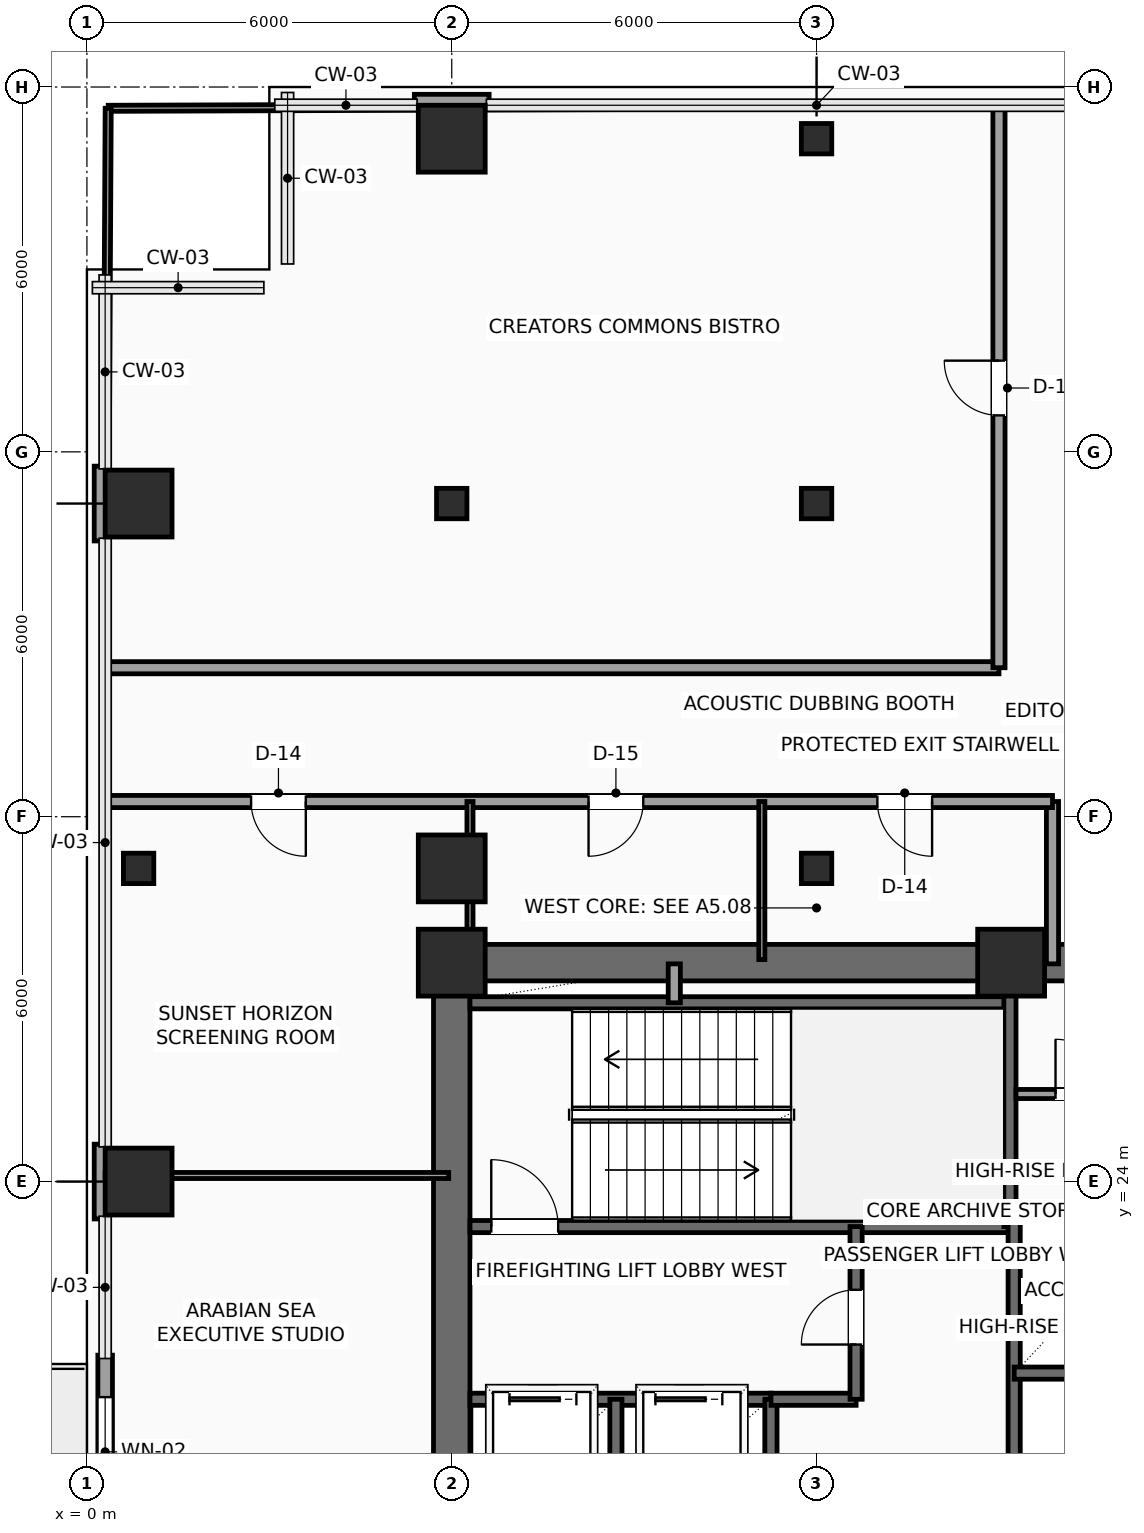
"""IFC4 building model, lengths in metres.
Left out: names, types, materials, properties, quantities, classifications, styles, units other than length and angle.
Written with IfcOpenShell. Run it as: python <this file> out.ifc"""

import sys

from ifc_helpers import new_model, si_unit, direction, frame, frame_2d, origin, origin_2d, place, context, subcontext, project, spatial, rectangle, hollow_rectangle, extrude, element, fill, save


model = new_model("IFC4")
c1 = context("Model", 3, precision=1e-05, world=origin(), true_north=direction((0.0, 1.0)))
c2 = subcontext(c1, "Body", "Model", "MODEL_VIEW")
j1 = project(units=[si_unit("LENGTHUNIT", "METRE"), si_unit("PLANEANGLEUNIT", "RADIAN")], contexts=[c1])
p1 = place(None, origin())
s1 = spatial("IfcSite", under=j1, at=p1, CompositionType="ELEMENT")
p2 = place(p1, origin())
s2 = spatial("IfcBuilding", under=s1, at=p2, CompositionType="ELEMENT")
p3 = place(p2, frame((0.0, 0.0, 145.65)))
s3 = spatial("IfcBuildingStorey", under=s2, at=p3, CompositionType="ELEMENT", Elevation=145.65)
for number, where, z_axis, x_axis in (
    (1, (6.0, 27.6, 0.0), (0.0, 0.0, 1.0), (1.0, 0.0, 0.0)),
    (2, (15.2, 27.6, 0.0), (0.0, 0.0, 1.0), (1.0, 0.0, 0.0)),
    (3, (0.85, 24.0, 0.0), (0.0, 0.0, 1.0), (1.0, 0.0, 0.0)),
):
    element("IfcColumn", number, at=place(p3, frame(where, z_axis=z_axis, x_axis=x_axis)), inside=s3, PredefinedType="COLUMN", context=c2, shape_type="SweptSolid", body=[
        extrude(rectangle(XDim=1.1, YDim=1.1, at=origin_2d()), origin(), (0.0, 0.0, 1.0), 3.75),
    ])
p4 = place(p3, frame((0.85, 29.15, 0.0), z_axis=(0.0, 0.0, 1.0), x_axis=(1.0, 0.0, 0.0)))
e4 = element("IfcColumn", 4, at=p4, inside=s3, PredefinedType="COLUMN", context=c2, shape_type="SweptSolid", body=[
    extrude(hollow_rectangle(XDim=0.5, YDim=0.5, WallThickness=0.025, InnerFilletRadius=0.025, OuterFilletRadius=0.04, at=origin_2d()), origin(), (0.0, 0.0, 1.0), 3.75),
])
for number, where, z_axis, x_axis in (
    (5, (0.85, 35.15, 0.0), (0.0, 0.0, 1.0), (1.0, 0.0, 0.0)),
    (6, (6.0, 29.15, 0.0), (0.0, 0.0, 1.0), (1.0, 0.0, 0.0)),
):
    element("IfcColumn", number, at=place(p3, frame(where, z_axis=z_axis, x_axis=x_axis)), inside=s3, PredefinedType="COLUMN", context=c2, shape_type="SweptSolid", body=[
        extrude(rectangle(XDim=1.1, YDim=1.1, at=origin_2d()), origin(), (0.0, 0.0, 1.0), 3.75),
    ])
p5 = place(p3, frame((6.0, 35.15, 0.0), z_axis=(0.0, 0.0, 1.0), x_axis=(1.0, 0.0, 0.0)))
e7 = element("IfcColumn", 7, at=p5, inside=s3, PredefinedType="COLUMN", context=c2, shape_type="SweptSolid", body=[
    extrude(hollow_rectangle(XDim=0.5, YDim=0.5, WallThickness=0.025, InnerFilletRadius=0.025, OuterFilletRadius=0.04, at=origin_2d()), origin(), (0.0, 0.0, 1.0), 3.75),
])
p6 = place(p3, frame((6.0, 41.15, 0.0), z_axis=(0.0, 0.0, 1.0), x_axis=(1.0, 0.0, 0.0)))
e8 = element("IfcColumn", 8, at=p6, inside=s3, PredefinedType="COLUMN", context=c2, shape_type="SweptSolid", body=[
    extrude(rectangle(XDim=1.1, YDim=1.1, at=origin_2d()), origin(), (0.0, 0.0, 1.0), 3.75),
])
for number, where, z_axis, x_axis in (
    (9, (12.0, 29.15, 0.0), (0.0, 0.0, 1.0), (1.0, 0.0, 0.0)),
    (10, (12.0, 35.15, 0.0), (0.0, 0.0, 1.0), (1.0, 0.0, 0.0)),
    (11, (12.0, 41.15, 0.0), (0.0, 0.0, 1.0), (1.0, 0.0, 0.0)),
):
    element("IfcColumn", number, at=place(p3, frame(where, z_axis=z_axis, x_axis=x_axis)), inside=s3, PredefinedType="COLUMN", context=c2, shape_type="SweptSolid", body=[
        extrude(hollow_rectangle(XDim=0.5, YDim=0.5, WallThickness=0.025, InnerFilletRadius=0.025, OuterFilletRadius=0.04, at=origin_2d()), origin(), (0.0, 0.0, 1.0), 3.75),
    ])
p7 = place(p3, frame((0.3, 11.855, 0.0), z_axis=(0.0, 0.0, 1.0), x_axis=(0.0, 1.0, 0.0)))
e12 = element("IfcWall", 12, at=p7, inside=s3, PredefinedType="SOLIDWALL", context=c2, shape_type="SweptSolid", body=[
    extrude(rectangle(XDim=9.29, YDim=0.24, at=frame_2d((4.645, 0.0))), origin(), (0.0, 0.0, 1.0), 3.525),
])
p8 = place(p7, frame((4.2, 0.0, 0.0)))
e13 = element("IfcOpeningElement", 13, at=p8, cuts=e12, PredefinedType="OPENING", context=c2, shape_type="SweptSolid", body=[
    extrude(rectangle(XDim=1.05, YDim=2.2, at=frame_2d((0.525, 1.1))), frame((0.0, 0.13, 0.0), z_axis=(0.0, -1.0, 0.0), x_axis=(1.0, 0.0, 0.0)), (0.0, 0.0, 1.0), 0.26),
])
p9 = place(p7, frame((6.8, 0.0, 0.85)))
e14 = element("IfcOpeningElement", 14, at=p9, cuts=e12, PredefinedType="OPENING", context=c2, shape_type="SweptSolid", body=[
    extrude(rectangle(XDim=1.8, YDim=2.1, at=frame_2d((0.9, 1.05))), frame((0.0, 0.13, 0.0), z_axis=(0.0, -1.0, 0.0), x_axis=(1.0, 0.0, 0.0)), (0.0, 0.0, 1.0), 0.26),
])
for number, where, z_axis, x_axis in (
    (15, (0.24, 23.385, 0.0), (0.0, 0.0, 1.0), (0.0, 1.0, 0.0)),
    (16, (0.24, 34.535, 0.0), (0.0, 0.0, 1.0), (0.0, 1.0, 0.0)),
    (17, (5.385, 41.76, 0.0), (0.0, 0.0, 1.0), (1.0, 0.0, 0.0)),
):
    element("IfcWall", number, at=place(p3, frame(where, z_axis=z_axis, x_axis=x_axis)), inside=s3, PredefinedType="SOLIDWALL", context=c2, shape_type="SweptSolid", body=[
        extrude(rectangle(XDim=1.23, YDim=0.24, at=frame_2d((0.615, 0.0))), origin(), (0.0, 0.0, 1.0), 3.525),
    ])
p10 = place(p3, frame((6.0, 27.6, 0.0), z_axis=(0.0, 0.0, 1.0), x_axis=(1.0, 0.0, 0.0)))
e18 = element("IfcWall", 18, at=p10, inside=s3, PredefinedType="SHEAR", context=c2, shape_type="SweptSolid", body=[
    extrude(rectangle(XDim=12.0, YDim=0.6, at=frame_2d((6.0, 0.0))), origin(), (0.0, 0.0, 1.0), 3.525),
])
p11 = place(p10, frame((10.2, 0.0, 0.0)))
e19 = element("IfcOpeningElement", 19, at=p11, cuts=e18, PredefinedType="OPENING", context=c2, shape_type="SweptSolid", body=[
    extrude(rectangle(XDim=0.9, YDim=2.15, at=frame_2d((0.45, 1.075))), frame((0.0, 0.31, 0.0), z_axis=(0.0, -1.0, 0.0), x_axis=(1.0, 0.0, 0.0)), (0.0, 0.0, 1.0), 0.62),
])
p12 = place(p3, frame((6.0, 18.0, 0.0), z_axis=(0.0, 0.0, 1.0), x_axis=(0.0, 1.0, 0.0)))
e20 = element("IfcWall", 20, at=p12, inside=s3, PredefinedType="SHEAR", context=c2, shape_type="SweptSolid", body=[
    extrude(rectangle(XDim=9.6, YDim=0.6, at=frame_2d((4.8, 0.0))), origin(), (0.0, 0.0, 1.0), 3.525),
])
p13 = place(p3, frame((6.3, 23.26, 0.0), z_axis=(0.0, 0.0, 1.0), x_axis=(1.0, 0.0, 0.0)))
e21 = element("IfcWall", 21, at=p13, inside=s3, PredefinedType="SHEAR", context=c2, shape_type="SweptSolid", body=[
    extrude(rectangle(XDim=8.88, YDim=0.2, at=frame_2d((4.44, 0.0))), origin(), (0.0, 0.0, 1.0), 3.525),
])
p14 = place(p13, frame((0.35, 0.0, 0.0)))
e22 = element("IfcOpeningElement", 22, at=p14, cuts=e21, PredefinedType="OPENING", context=c2, shape_type="SweptSolid", body=[
    extrude(rectangle(XDim=1.1, YDim=2.2, at=frame_2d((0.55, 1.1))), frame((0.0, 0.11, 0.0), z_axis=(0.0, -1.0, 0.0), x_axis=(1.0, 0.0, 0.0)), (0.0, 0.0, 1.0), 0.22),
])
p15 = place(p3, frame((6.3, 26.94, 0.0), z_axis=(0.0, 0.0, 1.0), x_axis=(1.0, 0.0, 0.0)))
e23 = element("IfcWall", 23, at=p15, inside=s3, PredefinedType="SHEAR", context=c2, shape_type="SweptSolid", body=[
    extrude(rectangle(XDim=8.88, YDim=0.2, at=frame_2d((4.44, 0.0))), origin(), (0.0, 0.0, 1.0), 3.525),
])
p16 = place(p3, frame((15.18, 23.26, 0.0), z_axis=(0.0, 0.0, 1.0), x_axis=(0.0, 1.0, 0.0)))
e24 = element("IfcWall", 24, at=p16, inside=s3, PredefinedType="SHEAR", context=c2, shape_type="SweptSolid", body=[
    extrude(rectangle(XDim=4.04, YDim=0.2, at=frame_2d((2.02, 0.0))), origin(), (0.0, 0.0, 1.0), 3.525),
])
p17 = place(p3, frame((6.3, 20.42, 0.0), z_axis=(0.0, 0.0, 1.0), x_axis=(1.0, 0.0, 0.0)))
e25 = element("IfcWall", 25, at=p17, inside=s3, PredefinedType="SHEAR", context=c2, shape_type="SweptSolid", body=[
    extrude(rectangle(XDim=4.95, YDim=0.2, at=frame_2d((2.475, 0.0))), origin(), (0.0, 0.0, 1.0), 3.525),
])
p18 = place(p17, frame((0.65, 0.0, 0.0)))
e26 = element("IfcOpeningElement", 26, at=p18, cuts=e25, PredefinedType="OPENING", context=c2, shape_type="SweptSolid", body=[
    extrude(rectangle(XDim=1.1, YDim=2.2, at=frame_2d((0.55, 1.1))), frame((0.0, 0.11, 0.0), z_axis=(0.0, -1.0, 0.0), x_axis=(1.0, 0.0, 0.0)), (0.0, 0.0, 1.0), 0.22),
])
p19 = place(p17, frame((3.05, 0.0, 0.0)))
e27 = element("IfcOpeningElement", 27, at=p19, cuts=e25, PredefinedType="OPENING", context=c2, shape_type="SweptSolid", body=[
    extrude(rectangle(XDim=1.1, YDim=2.2, at=frame_2d((0.55, 1.1))), frame((0.0, 0.11, 0.0), z_axis=(0.0, -1.0, 0.0), x_axis=(1.0, 0.0, 0.0)), (0.0, 0.0, 1.0), 0.22),
])
for number, where, z_axis, x_axis in (
    (28, (8.7, 18.25, 0.0), (0.0, 0.0, 1.0), (0.0, 1.0, 0.0)),
    (29, (11.25, 18.25, 0.0), (0.0, 0.0, 1.0), (0.0, 1.0, 0.0)),
):
    element("IfcWall", number, at=place(p3, frame(where, z_axis=z_axis, x_axis=x_axis)), inside=s3, PredefinedType="SHEAR", context=c2, shape_type="SweptSolid", body=[
        extrude(rectangle(XDim=2.17, YDim=0.2, at=frame_2d((1.085, 0.0))), origin(), (0.0, 0.0, 1.0), 3.525),
    ])
p20 = place(p3, frame((11.25, 20.42, 0.0), z_axis=(0.0, 0.0, 1.0), x_axis=(1.0, 0.0, 0.0)))
e30 = element("IfcWall", 30, at=p20, inside=s3, PredefinedType="SHEAR", context=c2, shape_type="SweptSolid", body=[
    extrude(rectangle(XDim=1.4, YDim=0.2, at=frame_2d((0.7, 0.0))), origin(), (0.0, 0.0, 1.0), 3.525),
])
p21 = place(p3, frame((12.65, 20.42, 0.0), z_axis=(0.0, 0.0, 1.0), x_axis=(0.0, 1.0, 0.0)))
e31 = element("IfcWall", 31, at=p21, inside=s3, PredefinedType="SHEAR", context=c2, shape_type="SweptSolid", body=[
    extrude(rectangle(XDim=2.84, YDim=0.2, at=frame_2d((1.42, 0.0))), origin(), (0.0, 0.0, 1.0), 3.525),
])
p22 = place(p21, frame((0.9, 0.0, 0.0)))
e32 = element("IfcOpeningElement", 32, at=p22, cuts=e31, PredefinedType="OPENING", context=c2, shape_type="SweptSolid", body=[
    extrude(rectangle(XDim=0.9, YDim=2.15, at=frame_2d((0.45, 1.075))), frame((0.0, 0.11, 0.0), z_axis=(0.0, -1.0, 0.0), x_axis=(1.0, 0.0, 0.0)), (0.0, 0.0, 1.0), 0.22),
])
p23 = place(p3, frame((9.66, 26.94, 0.0), z_axis=(0.0, 0.0, 1.0), x_axis=(0.0, 1.0, 0.0)))
e33 = element("IfcWall", 33, at=p23, inside=s3, PredefinedType="SOLIDWALL", context=c2, shape_type="SweptSolid", body=[
    extrude(rectangle(XDim=0.64, YDim=0.2, at=frame_2d((0.32, 0.0))), origin(), (0.0, 0.0, 1.0), 3.525),
])
p24 = place(p3, frame((15.25, 18.25, 0.0), z_axis=(0.0, 0.0, 1.0), x_axis=(0.0, 1.0, 0.0)))
e34 = element("IfcWall", 34, at=p24, inside=s3, PredefinedType="SHEAR", context=c2, shape_type="SweptSolid", body=[
    extrude(rectangle(XDim=5.2, YDim=0.2, at=frame_2d((2.6, 0.0))), origin(), (0.0, 0.0, 1.0), 3.525),
])
p25 = place(p3, frame((15.25, 20.85, 0.0), z_axis=(0.0, 0.0, 1.0), x_axis=(1.0, 0.0, 0.0)))
e35 = element("IfcWall", 35, at=p25, inside=s3, PredefinedType="SHEAR", context=c2, shape_type="SweptSolid", body=[
    extrude(rectangle(XDim=2.4, YDim=0.2, at=frame_2d((1.2, 0.0))), origin(), (0.0, 0.0, 1.0), 3.525),
])
p26 = place(p3, frame((15.25, 23.45, 0.0), z_axis=(0.0, 0.0, 1.0), x_axis=(1.0, 0.0, 0.0)))
e36 = element("IfcWall", 36, at=p26, inside=s3, PredefinedType="SHEAR", context=c2, shape_type="SweptSolid", body=[
    extrude(rectangle(XDim=2.45, YDim=0.2, at=frame_2d((1.225, 0.0))), origin(), (0.0, 0.0, 1.0), 3.525),
])
p27 = place(p3, frame((15.28, 25.44, 0.0), z_axis=(0.0, 0.0, 1.0), x_axis=(1.0, 0.0, 0.0)))
e37 = element("IfcWall", 37, at=p27, inside=s3, PredefinedType="PARTITIONING", context=c2, shape_type="SweptSolid", body=[
    extrude(rectangle(XDim=2.42, YDim=0.15, at=frame_2d((1.21, 0.0))), origin(), (0.0, 0.0, 1.0), 3.525),
])
p28 = place(p27, frame((0.65, 0.0, 0.0)))
e38 = element("IfcOpeningElement", 38, at=p28, cuts=e37, PredefinedType="OPENING", context=c2, shape_type="SweptSolid", body=[
    extrude(rectangle(XDim=0.9, YDim=2.15, at=frame_2d((0.45, 1.075))), frame((0.0, 0.085, 0.0), z_axis=(0.0, -1.0, 0.0), x_axis=(1.0, 0.0, 0.0)), (0.0, 0.0, 1.0), 0.17),
])
p29 = place(p3, frame((15.88, 27.58, 0.0), z_axis=(0.0, 0.0, 1.0), x_axis=(0.0, 1.0, 0.0)))
e39 = element("IfcWall", 39, at=p29, inside=s3, PredefinedType="PARTITIONING", context=c2, shape_type="SweptSolid", body=[
    extrude(rectangle(XDim=2.67, YDim=0.2, at=frame_2d((1.335, 0.0))), origin(), (0.0, 0.0, 1.0), 3.525),
])
p30 = place(p3, frame((15.88, 30.25, 0.0), z_axis=(0.0, 0.0, 1.0), x_axis=(-1.0, 0.0, 0.0)))
e40 = element("IfcWall", 40, at=p30, inside=s3, PredefinedType="PARTITIONING", context=c2, shape_type="SweptSolid", body=[
    extrude(rectangle(XDim=15.58, YDim=0.2, at=frame_2d((7.79, 0.0))), origin(), (0.0, 0.0, 1.0), 3.525),
])
p31 = place(p30, frame((12.28, 0.0, 0.0)))
e41 = element("IfcOpeningElement", 41, at=p31, cuts=e40, PredefinedType="OPENING", context=c2, shape_type="SweptSolid", body=[
    extrude(rectangle(XDim=0.9, YDim=2.1, at=frame_2d((0.45, 1.05))), frame((0.0, 0.11, 0.0), z_axis=(0.0, -1.0, 0.0), x_axis=(1.0, 0.0, 0.0)), (0.0, 0.0, 1.0), 0.22),
])
p32 = place(p30, frame((6.73, 0.0, 0.0)))
e42 = element("IfcOpeningElement", 42, at=p32, cuts=e40, PredefinedType="OPENING", context=c2, shape_type="SweptSolid", body=[
    extrude(rectangle(XDim=0.9, YDim=2.1, at=frame_2d((0.45, 1.05))), frame((0.0, 0.11, 0.0), z_axis=(0.0, -1.0, 0.0), x_axis=(1.0, 0.0, 0.0)), (0.0, 0.0, 1.0), 0.22),
])
p33 = place(p30, frame((1.98, 0.0, 0.0)))
e43 = element("IfcOpeningElement", 43, at=p33, cuts=e40, PredefinedType="OPENING", context=c2, shape_type="SweptSolid", body=[
    extrude(rectangle(XDim=0.9, YDim=2.1, at=frame_2d((0.45, 1.05))), frame((0.0, 0.11, 0.0), z_axis=(0.0, -1.0, 0.0), x_axis=(1.0, 0.0, 0.0)), (0.0, 0.0, 1.0), 0.22),
])
p34 = place(p3, frame((0.3, 32.45, 0.0), z_axis=(0.0, 0.0, 1.0), x_axis=(1.0, 0.0, 0.0)))
e44 = element("IfcWall", 44, at=p34, inside=s3, PredefinedType="PARTITIONING", context=c2, shape_type="SweptSolid", body=[
    extrude(rectangle(XDim=14.7, YDim=0.2, at=frame_2d((7.35, 0.0))), origin(), (0.0, 0.0, 1.0), 3.525),
])
p35 = place(p3, frame((15.0, 32.45, 0.0), z_axis=(0.0, 0.0, 1.0), x_axis=(0.0, 1.0, 0.0)))
e45 = element("IfcWall", 45, at=p35, inside=s3, PredefinedType="PARTITIONING", context=c2, shape_type="SweptSolid", body=[
    extrude(rectangle(XDim=9.25, YDim=0.2, at=frame_2d((4.625, 0.0))), origin(), (0.0, 0.0, 1.0), 3.525),
])
p36 = place(p35, frame((4.15, 0.0, 0.0)))
e46 = element("IfcOpeningElement", 46, at=p36, cuts=e45, PredefinedType="OPENING", context=c2, shape_type="SweptSolid", body=[
    extrude(rectangle(XDim=0.9, YDim=2.1, at=frame_2d((0.45, 1.05))), frame((0.0, 0.11, 0.0), z_axis=(0.0, -1.0, 0.0), x_axis=(1.0, 0.0, 0.0)), (0.0, 0.0, 1.0), 0.22),
])
p37 = place(p3, frame((0.3, 24.1, 0.0), z_axis=(0.0, 0.0, 1.0), x_axis=(1.0, 0.0, 0.0)))
e47 = element("IfcWall", 47, at=p37, inside=s3, PredefinedType="PARTITIONING", context=c2, shape_type="SweptSolid", body=[
    extrude(rectangle(XDim=5.65, YDim=0.1, at=frame_2d((2.825, 0.0))), origin(), (0.0, 0.0, 1.0), 3.525),
])
for number, where, z_axis, x_axis in (
    (48, (6.3, 27.65, 0.0), (0.0, 0.0, 1.0), (0.0, 1.0, 0.0)),
    (49, (11.1, 27.65, 0.0), (0.0, 0.0, 1.0), (0.0, 1.0, 0.0)),
):
    element("IfcWall", number, at=place(p3, frame(where, z_axis=z_axis, x_axis=x_axis)), inside=s3, PredefinedType="PARTITIONING", context=c2, shape_type="SweptSolid", body=[
        extrude(rectangle(XDim=2.6, YDim=0.1, at=frame_2d((1.3, 0.0))), origin(), (0.0, 0.0, 1.0), 3.525),
    ])
p38 = place(p3, frame((0.35, 41.65, 0.0), z_axis=(0.0, 0.0, 1.0), x_axis=(0.999994073761, 0.003442737683, 0.0)))
e50 = element("IfcWall", 50, at=p38, inside=s3, PredefinedType="PARTITIONING", context=c2, shape_type="SweptSolid", body=[
    extrude(rectangle(XDim=5.035, YDim=0.1, at=frame_2d((2.518, 0.0))), origin(), (0.0, 0.0, 1.0), 3.525),
])
p39 = place(p3, frame((6.615, 41.671, 0.0), z_axis=(0.0, 0.0, 1.0), x_axis=(0.999994197557, 0.003406589638, 0.0)))
e51 = element("IfcWall", 51, at=p39, inside=s3, PredefinedType="PARTITIONING", context=c2, shape_type="SweptSolid", body=[
    extrude(rectangle(XDim=8.385, YDim=0.1, at=frame_2d((4.192, 0.0))), origin(), (0.0, 0.0, 1.0), 3.525),
])
p40 = place(p3, frame((0.3, 32.45, 0.0), z_axis=(0.0, 0.0, 1.0), x_axis=(0.005386338724, 0.999985493572, 0.0)))
e52 = element("IfcWall", 52, at=p40, inside=s3, PredefinedType="PARTITIONING", context=c2, shape_type="SweptSolid", body=[
    extrude(rectangle(XDim=2.085, YDim=0.1, at=frame_2d((1.042, 0.0))), origin(), (0.0, 0.0, 1.0), 3.525),
])
p41 = place(p3, frame((0.318, 35.765, 0.0), z_axis=(0.0, 0.0, 1.0), x_axis=(0.005434476894, 0.999985233121, 0.0)))
e53 = element("IfcWall", 53, at=p41, inside=s3, PredefinedType="PARTITIONING", context=c2, shape_type="SweptSolid", body=[
    extrude(rectangle(XDim=5.885, YDim=0.1, at=frame_2d((2.942, 0.0))), origin(), (0.0, 0.0, 1.0), 3.525),
])
p42 = place(p9, origin())
e54 = element("IfcWindow", 54, at=p42, inside=s3, PartitioningType="SINGLE_PANEL", PredefinedType="WINDOW", context=c2, shape_type="SweptSolid", body=[
    extrude(rectangle(XDim=1.8, YDim=2.1, at=frame_2d((0.9, 1.05))), frame((0.0, 0.03, 0.0), z_axis=(0.0, -1.0, 0.0), x_axis=(1.0, 0.0, 0.0)), (0.0, 0.0, 1.0), 0.06),
])
fill(e14, e54)
p43 = place(p14, origin())
e55 = element("IfcDoor", 55, at=p43, inside=s3, OperationType="SINGLE_SWING_LEFT", PredefinedType="DOOR", context=c2, shape_type="SweptSolid", body=[
    extrude(rectangle(XDim=1.1, YDim=2.2, at=frame_2d((0.55, 1.1))), frame((0.0, 0.025, 0.0), z_axis=(0.0, -1.0, 0.0), x_axis=(1.0, 0.0, 0.0)), (0.0, 0.0, 1.0), 0.05),
])
fill(e22, e55)
p44 = place(p18, origin())
e56 = element("IfcDoor", 56, at=p44, inside=s3, OperationType="SLIDING_TO_LEFT", PredefinedType="DOOR", context=c2, shape_type="SweptSolid", body=[
    extrude(rectangle(XDim=1.1, YDim=2.2, at=frame_2d((0.55, 1.1))), frame((0.0, 0.025, 0.0), z_axis=(0.0, -1.0, 0.0), x_axis=(1.0, 0.0, 0.0)), (0.0, 0.0, 1.0), 0.05),
])
fill(e26, e56)
p45 = place(p19, origin())
e57 = element("IfcDoor", 57, at=p45, inside=s3, OperationType="SLIDING_TO_LEFT", PredefinedType="DOOR", context=c2, shape_type="SweptSolid", body=[
    extrude(rectangle(XDim=1.1, YDim=2.2, at=frame_2d((0.55, 1.1))), frame((0.0, 0.025, 0.0), z_axis=(0.0, -1.0, 0.0), x_axis=(1.0, 0.0, 0.0)), (0.0, 0.0, 1.0), 0.05),
])
fill(e27, e57)
p46 = place(p22, origin())
e58 = element("IfcDoor", 58, at=p46, inside=s3, OperationType="SINGLE_SWING_LEFT", PredefinedType="DOOR", context=c2, shape_type="SweptSolid", body=[
    extrude(rectangle(XDim=0.9, YDim=2.15, at=frame_2d((0.45, 1.075))), frame((0.0, 0.025, 0.0), z_axis=(0.0, -1.0, 0.0), x_axis=(1.0, 0.0, 0.0)), (0.0, 0.0, 1.0), 0.05),
])
fill(e32, e58)
p47 = place(p28, origin())
e59 = element("IfcDoor", 59, at=p47, inside=s3, OperationType="SINGLE_SWING_LEFT", PredefinedType="DOOR", context=c2, shape_type="SweptSolid", body=[
    extrude(rectangle(XDim=0.9, YDim=2.15, at=frame_2d((0.45, 1.075))), frame((0.0, 0.025, 0.0), z_axis=(0.0, -1.0, 0.0), x_axis=(1.0, 0.0, 0.0)), (0.0, 0.0, 1.0), 0.05),
])
fill(e38, e59)
p48 = place(p31, origin())
e60 = element("IfcDoor", 60, at=p48, inside=s3, OperationType="SINGLE_SWING_LEFT", PredefinedType="DOOR", context=c2, shape_type="SweptSolid", body=[
    extrude(rectangle(XDim=0.9, YDim=2.1, at=frame_2d((0.45, 1.05))), frame((0.0, 0.025, 0.0), z_axis=(0.0, -1.0, 0.0), x_axis=(1.0, 0.0, 0.0)), (0.0, 0.0, 1.0), 0.05),
])
fill(e41, e60)
p49 = place(p32, origin())
e61 = element("IfcDoor", 61, at=p49, inside=s3, OperationType="SINGLE_SWING_RIGHT", PredefinedType="DOOR", context=c2, shape_type="SweptSolid", body=[
    extrude(rectangle(XDim=0.9, YDim=2.1, at=frame_2d((0.45, 1.05))), frame((0.0, 0.025, 0.0), z_axis=(0.0, -1.0, 0.0), x_axis=(1.0, 0.0, 0.0)), (0.0, 0.0, 1.0), 0.05),
])
fill(e42, e61)
p50 = place(p33, origin())
e62 = element("IfcDoor", 62, at=p50, inside=s3, OperationType="SINGLE_SWING_LEFT", PredefinedType="DOOR", context=c2, shape_type="SweptSolid", body=[
    extrude(rectangle(XDim=0.9, YDim=2.1, at=frame_2d((0.45, 1.05))), frame((0.0, 0.025, 0.0), z_axis=(0.0, -1.0, 0.0), x_axis=(1.0, 0.0, 0.0)), (0.0, 0.0, 1.0), 0.05),
])
fill(e43, e62)
p51 = place(p36, origin())
e63 = element("IfcDoor", 63, at=p51, inside=s3, OperationType="SINGLE_SWING_RIGHT", PredefinedType="DOOR", context=c2, shape_type="SweptSolid", body=[
    extrude(rectangle(XDim=0.9, YDim=2.1, at=frame_2d((0.45, 1.05))), frame((0.0, 0.025, 0.0), z_axis=(0.0, -1.0, 0.0), x_axis=(1.0, 0.0, 0.0)), (0.0, 0.0, 1.0), 0.05),
])
fill(e46, e63)
save(model, sys.argv[1])
